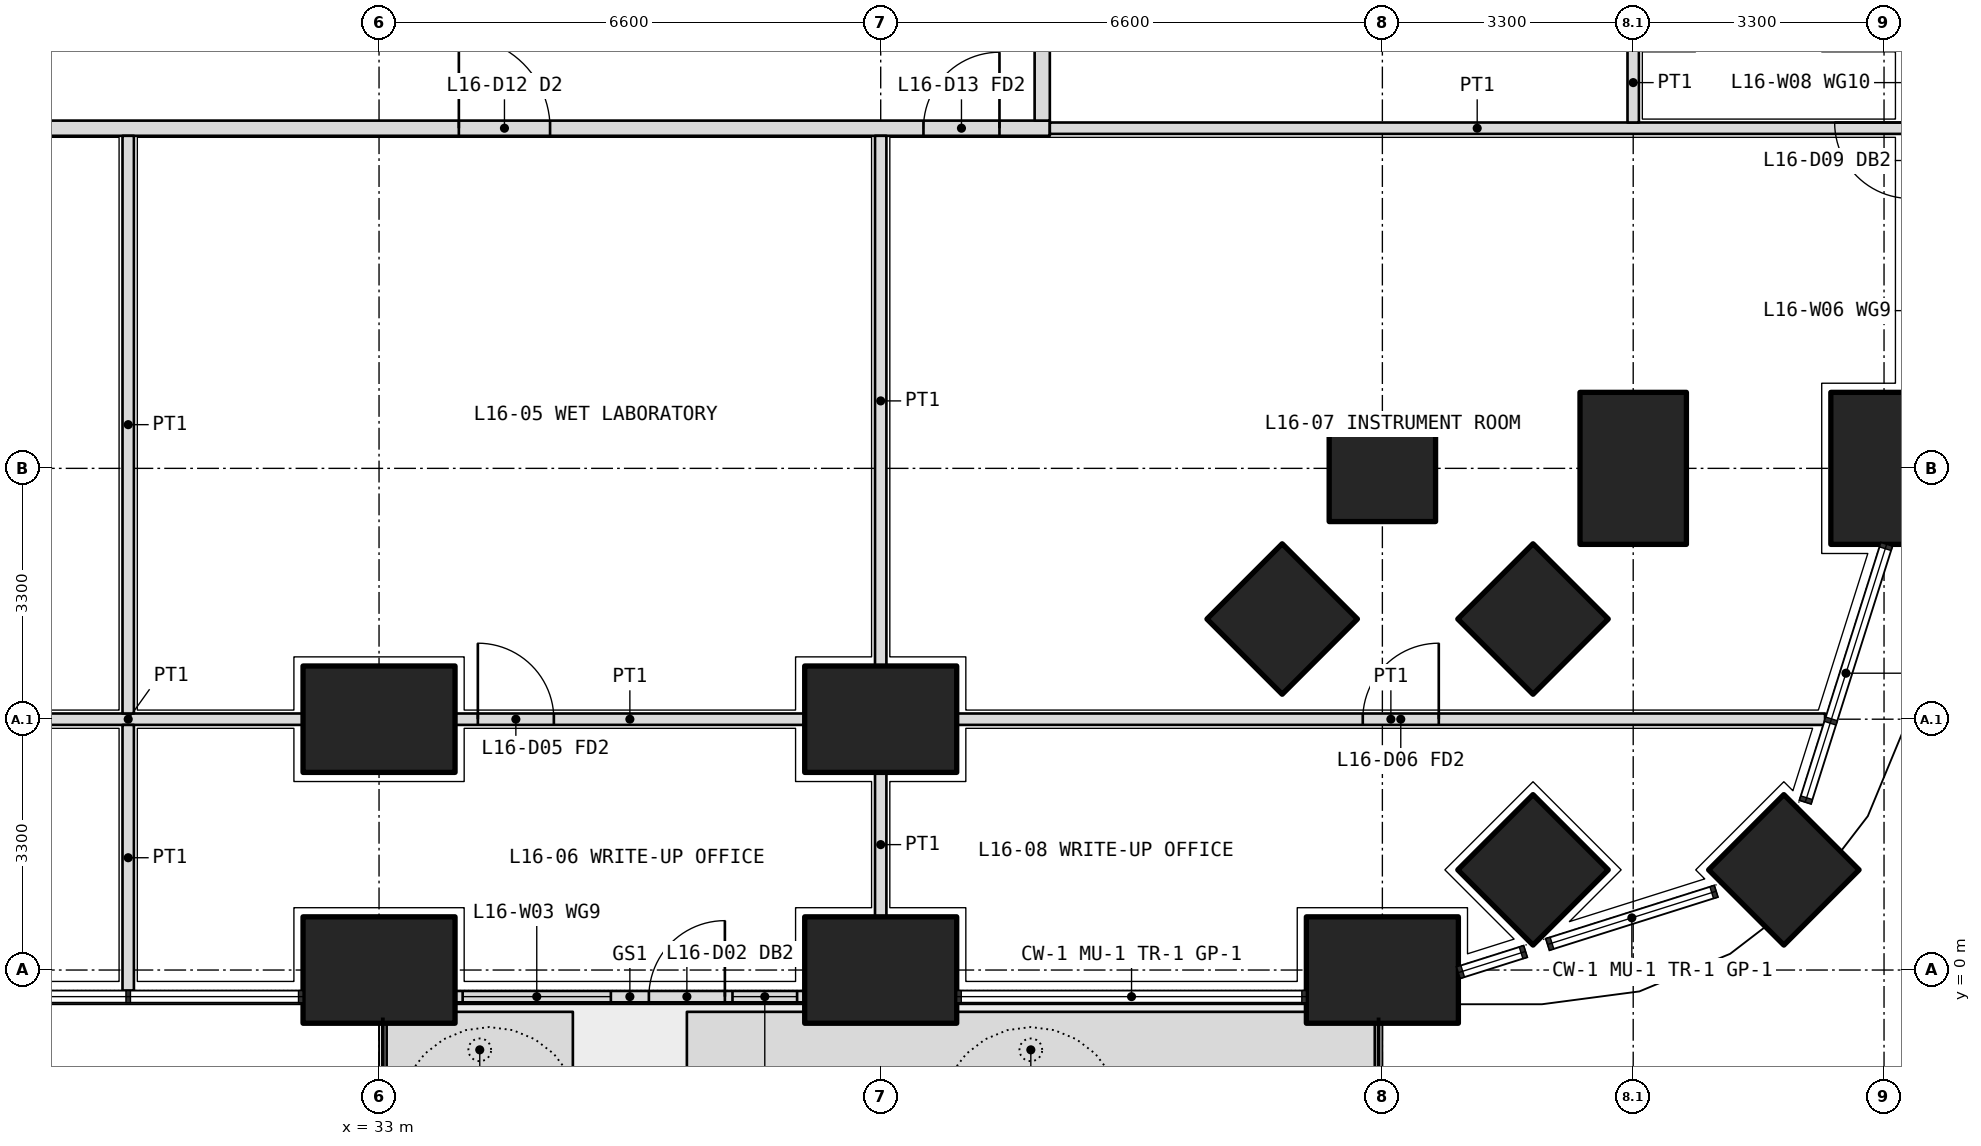
"""IFC4 building model, lengths in metres.
Left out: names, types, materials, properties, quantities, classifications, styles, units other than length and angle.
Written with IfcOpenShell. Run it as: python <this file> out.ifc"""

import sys

from ifc_helpers import new_model, si_unit, direction, frame, frame_2d, origin, origin_2d, place, context, subcontext, project, spatial, polyline, rectangle, outline, extrude, element, fill, save


model = new_model("IFC4")
c1 = context("Model", 3, precision=1e-05, world=origin(), true_north=direction((0.0, 1.0)))
c2 = subcontext(c1, "Body", "Model", "MODEL_VIEW")
j1 = project(units=[si_unit("LENGTHUNIT", "METRE"), si_unit("PLANEANGLEUNIT", "RADIAN")], contexts=[c1])
p1 = place(None, origin())
s1 = spatial("IfcSite", under=j1, at=p1, CompositionType="ELEMENT")
p2 = place(p1, origin())
s2 = spatial("IfcBuilding", under=s1, at=p2, CompositionType="ELEMENT")
p3 = place(p2, frame((0.0, 0.0, 71.7)))
s3 = spatial("IfcBuildingStorey", under=s2, at=p3, CompositionType="ELEMENT", Elevation=71.7)
p4 = place(p3, frame((51.482, 1.318, 0.0), z_axis=(0.0, 0.0, 1.0), x_axis=(0.707106781187, 0.707106781187, 0.0)))
e1 = element("IfcColumn", 1, at=p4, inside=s3, PredefinedType="COLUMN", context=c2, shape_type="SweptSolid", body=[
    extrude(rectangle(XDim=1.4, YDim=1.4, at=origin_2d()), origin(), (0.0, 0.0, 1.0), 4.2),
])
for number, where, z_axis, x_axis in (
    (2, (33.0, 0.0, 0.0), (0.0, 0.0, 1.0), (1.0, 0.0, 0.0)),
    (3, (39.6, 0.0, 0.0), (0.0, 0.0, 1.0), (1.0, 0.0, 0.0)),
    (4, (46.2, 0.0, 0.0), (0.0, 0.0, 1.0), (1.0, 0.0, 0.0)),
    (5, (52.8, 6.6, 0.0), (0.0, 0.0, 1.0), (0.0, 1.0, 0.0)),
):
    element("IfcColumn", number, at=place(p3, frame(where, z_axis=z_axis, x_axis=x_axis)), inside=s3, PredefinedType="COLUMN", context=c2, shape_type="SweptSolid", body=[
        extrude(rectangle(XDim=2.0, YDim=1.4, at=origin_2d()), origin(), (0.0, 0.0, 1.0), 4.2),
    ])
for number, where, z_axis, x_axis in (
    (6, (46.2, 6.6, 0.0), (0.0, 0.0, 1.0), (1.0, 0.0, 0.0)),
    (7, (48.182, 1.318, 0.0), (0.0, 0.0, 1.0), (0.707, 0.707, 0.0)),
):
    element("IfcColumn", number, at=place(p3, frame(where, z_axis=z_axis, x_axis=x_axis)), inside=s3, PredefinedType="COLUMN", context=c2, shape_type="SweptSolid", body=[
        extrude(rectangle(XDim=1.4, YDim=1.4, at=origin_2d()), origin(), (0.0, 0.0, 1.0), 4.2),
    ])
p5 = place(p3, frame((49.5, 6.6, 0.0), z_axis=(0.0, 0.0, 1.0), x_axis=(0.0, 1.0, 0.0)))
e8 = element("IfcColumn", 8, at=p5, inside=s3, PredefinedType="COLUMN", context=c2, shape_type="SweptSolid", body=[
    extrude(rectangle(XDim=2.0, YDim=1.4, at=origin_2d()), origin(), (0.0, 0.0, 1.0), 4.2),
])
p6 = place(p3, frame((48.182, 4.618, 0.0), z_axis=(0.0, 0.0, 1.0), x_axis=(0.707106781187, 0.707106781187, 0.0)))
e9 = element("IfcColumn", 9, at=p6, inside=s3, PredefinedType="COLUMN", context=c2, shape_type="SweptSolid", body=[
    extrude(rectangle(XDim=1.4, YDim=1.4, at=origin_2d()), origin(), (0.0, 0.0, 1.0), 4.2),
])
for number, where, z_axis, x_axis in (
    (10, (33.0, 3.3, 0.0), (0.0, 0.0, 1.0), (1.0, 0.0, 0.0)),
    (11, (39.6, 3.3, 0.0), (0.0, 0.0, 1.0), (1.0, 0.0, 0.0)),
):
    element("IfcColumn", number, at=place(p3, frame(where, z_axis=z_axis, x_axis=x_axis)), inside=s3, PredefinedType="COLUMN", context=c2, shape_type="SweptSolid", body=[
        extrude(rectangle(XDim=2.0, YDim=1.4, at=origin_2d()), origin(), (0.0, 0.0, 1.0), 4.2),
    ])
p7 = place(p3, frame((44.882, 4.618, 0.0), z_axis=(0.0, 0.0, 1.0), x_axis=(0.707106781187, 0.707106781187, 0.0)))
e12 = element("IfcColumn", 12, at=p7, inside=s3, PredefinedType="COLUMN", context=c2, shape_type="SweptSolid", body=[
    extrude(rectangle(XDim=1.4, YDim=1.4, at=origin_2d()), origin(), (0.0, 0.0, 1.0), 4.2),
])
p8 = place(p3, origin())
e13 = element("IfcWall", 13, at=p8, inside=s3, PredefinedType="USERDEFINED", context=c2, shape_type="SweptSolid", body=[
    extrude(outline(polyline([(33.1, -1.55), (35.55, -1.55), (35.55, -0.55), (33.1, -0.55), (33.1, -1.55)]), holes=[polyline([(33.25, -1.4), (35.4, -1.4), (35.4, -0.7), (33.25, -0.7), (33.25, -1.4)])]), origin(), (0.0, 0.0, 1.0), 1.05),
])
p9 = place(p3, origin())
e14 = element("IfcWall", 14, at=p9, inside=s3, PredefinedType="USERDEFINED", context=c2, shape_type="SweptSolid", body=[
    extrude(outline(polyline([(37.05, -1.55), (46.1, -1.55), (46.1, -0.55), (37.05, -0.55), (37.05, -1.55)]), holes=[polyline([(37.2, -1.4), (45.95, -1.4), (45.95, -0.7), (37.2, -0.7), (37.2, -1.4)])]), origin(), (0.0, 0.0, 1.0), 1.05),
])
p10 = place(p3, frame((34.0, -0.35, 0.0), z_axis=(0.0, 0.0, 1.0), x_axis=(1.0, 0.0, 0.0)))
e15 = element("IfcWall", 15, at=p10, inside=s3, PredefinedType="SOLIDWALL", context=c2, shape_type="SweptSolid", body=[
    extrude(rectangle(XDim=4.6, YDim=0.15, at=frame_2d((2.3, 0.0))), origin(), (0.0, 0.0, 1.0), 2.05),
])
p11 = place(p10, frame((2.55, 0.0, 0.0)))
e16 = element("IfcOpeningElement", 16, at=p11, cuts=e15, PredefinedType="OPENING", context=c2, shape_type="SweptSolid", body=[
    extrude(rectangle(XDim=1.0, YDim=2.0, at=frame_2d((0.5, 1.0))), frame((0.0, 0.085, 0.0), z_axis=(0.0, -1.0, 0.0), x_axis=(1.0, 0.0, 0.0)), (0.0, 0.0, 1.0), 0.17),
])
p12 = place(p10, frame((0.1, 0.0, 0.1)))
e17 = element("IfcOpeningElement", 17, at=p12, cuts=e15, PredefinedType="OPENING", context=c2, shape_type="SweptSolid", body=[
    extrude(rectangle(XDim=1.95, YDim=1.65, at=frame_2d((0.975, 0.825))), frame((0.0, 0.085, 0.0), z_axis=(0.0, -1.0, 0.0), x_axis=(1.0, 0.0, 0.0)), (0.0, 0.0, 1.0), 0.17),
])
p13 = place(p10, frame((3.65, 0.0, 0.1)))
e18 = element("IfcOpeningElement", 18, at=p13, cuts=e15, PredefinedType="OPENING", context=c2, shape_type="SweptSolid", body=[
    extrude(rectangle(XDim=0.85, YDim=1.65, at=frame_2d((0.425, 0.825))), frame((0.0, 0.085, 0.0), z_axis=(0.0, -1.0, 0.0), x_axis=(1.0, 0.0, 0.0)), (0.0, 0.0, 1.0), 0.17),
])
p14 = place(p3, frame((10.975, 11.075, 0.0), z_axis=(0.0, 0.0, 1.0), x_axis=(1.0, 0.0, 0.0)))
e19 = element("IfcWall", 19, at=p14, inside=s3, PredefinedType="PARTITIONING", context=c2, shape_type="SweptSolid", body=[
    extrude(rectangle(XDim=30.85, YDim=0.2, at=frame_2d((15.425, 0.0))), origin(), (0.0, 0.0, 1.0), 2.55),
])
p15 = place(p14, frame((2.312, 0.0, 0.0)))
e20 = element("IfcOpeningElement", 20, at=p15, cuts=e19, PredefinedType="OPENING", context=c2, shape_type="SweptSolid", body=[
    extrude(rectangle(XDim=1.0, YDim=2.1, at=frame_2d((0.5, 1.05))), frame((0.0, 0.11, 0.0), z_axis=(0.0, -1.0, 0.0), x_axis=(1.0, 0.0, 0.0)), (0.0, 0.0, 1.0), 0.22),
])
p16 = place(p14, frame((11.625, 0.0, 0.0)))
e21 = element("IfcOpeningElement", 21, at=p16, cuts=e19, PredefinedType="OPENING", context=c2, shape_type="SweptSolid", body=[
    extrude(rectangle(XDim=1.0, YDim=2.1, at=frame_2d((0.5, 1.05))), frame((0.0, 0.11, 0.0), z_axis=(0.0, -1.0, 0.0), x_axis=(1.0, 0.0, 0.0)), (0.0, 0.0, 1.0), 0.22),
])
p17 = place(p14, frame((23.075, 0.0, 0.0)))
e22 = element("IfcOpeningElement", 22, at=p17, cuts=e19, PredefinedType="OPENING", context=c2, shape_type="SweptSolid", body=[
    extrude(rectangle(XDim=1.2, YDim=2.1, at=frame_2d((0.6, 1.05))), frame((0.0, 0.11, 0.0), z_axis=(0.0, -1.0, 0.0), x_axis=(1.0, 0.0, 0.0)), (0.0, 0.0, 1.0), 0.22),
])
p18 = place(p14, frame((29.188, 0.0, 0.0)))
e23 = element("IfcOpeningElement", 23, at=p18, cuts=e19, PredefinedType="OPENING", context=c2, shape_type="SweptSolid", body=[
    extrude(rectangle(XDim=1.0, YDim=2.1, at=frame_2d((0.5, 1.05))), frame((0.0, 0.11, 0.0), z_axis=(0.0, -1.0, 0.0), x_axis=(1.0, 0.0, 0.0)), (0.0, 0.0, 1.0), 0.22),
])
p19 = place(p3, frame((41.725, 11.175, 0.0), z_axis=(0.0, 0.0, 1.0), x_axis=(0.0, 1.0, 0.0)))
e24 = element("IfcWall", 24, at=p19, inside=s3, PredefinedType="PARTITIONING", context=c2, shape_type="SweptSolid", body=[
    extrude(rectangle(XDim=23.85, YDim=0.2, at=frame_2d((11.925, 0.0))), origin(), (0.0, 0.0, 1.0), 2.55),
])
p20 = place(p19, frame((3.762, 0.0, 0.0)))
e25 = element("IfcOpeningElement", 25, at=p20, cuts=e24, PredefinedType="OPENING", context=c2, shape_type="SweptSolid", body=[
    extrude(rectangle(XDim=1.0, YDim=2.1, at=frame_2d((0.5, 1.05))), frame((0.0, 0.11, 0.0), z_axis=(0.0, -1.0, 0.0), x_axis=(1.0, 0.0, 0.0)), (0.0, 0.0, 1.0), 0.22),
])
p21 = place(p19, frame((9.625, 0.0, 0.0)))
e26 = element("IfcOpeningElement", 26, at=p21, cuts=e24, PredefinedType="OPENING", context=c2, shape_type="SweptSolid", body=[
    extrude(rectangle(XDim=1.0, YDim=2.1, at=frame_2d((0.5, 1.05))), frame((0.0, 0.11, 0.0), z_axis=(0.0, -1.0, 0.0), x_axis=(1.0, 0.0, 0.0)), (0.0, 0.0, 1.0), 0.22),
])
p22 = place(p19, frame((12.975, 0.0, 0.0)))
e27 = element("IfcOpeningElement", 27, at=p22, cuts=e24, PredefinedType="OPENING", context=c2, shape_type="SweptSolid", body=[
    extrude(rectangle(XDim=0.9, YDim=2.1, at=frame_2d((0.45, 1.05))), frame((0.0, 0.11, 0.0), z_axis=(0.0, -1.0, 0.0), x_axis=(1.0, 0.0, 0.0)), (0.0, 0.0, 1.0), 0.22),
])
p23 = place(p19, frame((16.275, 0.0, 0.0)))
e28 = element("IfcOpeningElement", 28, at=p23, cuts=e24, PredefinedType="OPENING", context=c2, shape_type="SweptSolid", body=[
    extrude(rectangle(XDim=1.2, YDim=2.1, at=frame_2d((0.6, 1.05))), frame((0.0, 0.11, 0.0), z_axis=(0.0, -1.0, 0.0), x_axis=(1.0, 0.0, 0.0)), (0.0, 0.0, 1.0), 0.22),
])
p24 = place(p19, frame((19.575, 0.0, 0.0)))
e29 = element("IfcOpeningElement", 29, at=p24, cuts=e24, PredefinedType="OPENING", context=c2, shape_type="SweptSolid", body=[
    extrude(rectangle(XDim=1.2, YDim=2.1, at=frame_2d((0.6, 1.05))), frame((0.0, 0.11, 0.0), z_axis=(0.0, -1.0, 0.0), x_axis=(1.0, 0.0, 0.0)), (0.0, 0.0, 1.0), 0.22),
])
p25 = place(p19, frame((22.288, 0.0, 0.0)))
e30 = element("IfcOpeningElement", 30, at=p25, cuts=e24, PredefinedType="OPENING", context=c2, shape_type="SweptSolid", body=[
    extrude(rectangle(XDim=1.2, YDim=2.1, at=frame_2d((0.6, 1.05))), frame((0.0, 0.11, 0.0), z_axis=(0.0, -1.0, 0.0), x_axis=(1.0, 0.0, 0.0)), (0.0, 0.0, 1.0), 0.22),
])
p26 = place(p3, frame((53.07, 11.075, 0.0), z_axis=(0.0, 0.0, 1.0), x_axis=(-1.0, 0.0, 0.0)))
e31 = element("IfcWall", 31, at=p26, inside=s3, PredefinedType="PARTITIONING", context=c2, shape_type="SweptSolid", body=[
    extrude(rectangle(XDim=11.245, YDim=0.15, at=frame_2d((5.623, 0.0))), origin(), (0.0, 0.0, 1.0), 3.85),
])
p27 = place(p3, frame((27.4, 3.3, 0.0), z_axis=(0.0, 0.0, 1.0), x_axis=(1.0, 0.0, 0.0)))
e32 = element("IfcWall", 32, at=p27, inside=s3, PredefinedType="PARTITIONING", context=c2, shape_type="SweptSolid", body=[
    extrude(rectangle(XDim=4.6, YDim=0.15, at=frame_2d((2.3, 0.0))), origin(), (0.0, 0.0, 1.0), 2.55),
])
p28 = place(p3, frame((34.0, 3.3, 0.0), z_axis=(0.0, 0.0, 1.0), x_axis=(1.0, 0.0, 0.0)))
e33 = element("IfcWall", 33, at=p28, inside=s3, PredefinedType="PARTITIONING", context=c2, shape_type="SweptSolid", body=[
    extrude(rectangle(XDim=4.6, YDim=0.15, at=frame_2d((2.3, 0.0))), origin(), (0.0, 0.0, 1.0), 2.55),
])
p29 = place(p28, frame((0.3, 0.0, 0.0)))
e34 = element("IfcOpeningElement", 34, at=p29, cuts=e33, PredefinedType="OPENING", context=c2, shape_type="SweptSolid", body=[
    extrude(rectangle(XDim=1.0, YDim=2.1, at=frame_2d((0.5, 1.05))), frame((0.0, 0.085, 0.0), z_axis=(0.0, -1.0, 0.0), x_axis=(1.0, 0.0, 0.0)), (0.0, 0.0, 1.0), 0.17),
])
p30 = place(p3, frame((40.6, 3.3, 0.0), z_axis=(0.0, 0.0, 1.0), x_axis=(1.0, 0.0, 0.0)))
e35 = element("IfcWall", 35, at=p30, inside=s3, PredefinedType="PARTITIONING", context=c2, shape_type="SweptSolid", body=[
    extrude(rectangle(XDim=11.424, YDim=0.15, at=frame_2d((5.712, 0.0))), origin(), (0.0, 0.0, 1.0), 3.85),
])
p31 = place(p30, frame((5.342, 0.0, 0.0)))
e36 = element("IfcOpeningElement", 36, at=p31, cuts=e35, PredefinedType="OPENING", context=c2, shape_type="SweptSolid", body=[
    extrude(rectangle(XDim=1.0, YDim=2.1, at=frame_2d((0.5, 1.05))), frame((0.0, 0.085, 0.0), z_axis=(0.0, -1.0, 0.0), x_axis=(1.0, 0.0, 0.0)), (0.0, 0.0, 1.0), 0.17),
])
p32 = place(p3, frame((29.7, -0.27, 0.0), z_axis=(0.0, 0.0, 1.0), x_axis=(0.0, 1.0, 0.0)))
e37 = element("IfcWall", 37, at=p32, inside=s3, PredefinedType="PARTITIONING", context=c2, shape_type="SweptSolid", body=[
    extrude(rectangle(XDim=3.495, YDim=0.15, at=frame_2d((1.748, 0.0))), origin(), (0.0, 0.0, 1.0), 3.85),
])
p33 = place(p3, frame((29.7, 3.375, 0.0), z_axis=(0.0, 0.0, 1.0), x_axis=(0.0, 1.0, 0.0)))
e38 = element("IfcWall", 38, at=p33, inside=s3, PredefinedType="PARTITIONING", context=c2, shape_type="SweptSolid", body=[
    extrude(rectangle(XDim=7.6, YDim=0.15, at=frame_2d((3.8, 0.0))), origin(), (0.0, 0.0, 1.0), 3.85),
])
p34 = place(p3, frame((39.6, 0.7, 0.0), z_axis=(0.0, 0.0, 1.0), x_axis=(0.0, 1.0, 0.0)))
e39 = element("IfcWall", 39, at=p34, inside=s3, PredefinedType="PARTITIONING", context=c2, shape_type="SweptSolid", body=[
    extrude(rectangle(XDim=1.9, YDim=0.15, at=frame_2d((0.95, 0.0))), origin(), (0.0, 0.0, 1.0), 2.55),
])
p35 = place(p3, frame((39.6, 4.0, 0.0), z_axis=(0.0, 0.0, 1.0), x_axis=(0.0, 1.0, 0.0)))
e40 = element("IfcWall", 40, at=p35, inside=s3, PredefinedType="PARTITIONING", context=c2, shape_type="SweptSolid", body=[
    extrude(rectangle(XDim=6.975, YDim=0.15, at=frame_2d((3.488, 0.0))), origin(), (0.0, 0.0, 1.0), 2.55),
])
p36 = place(p3, frame((49.5, 11.15, 0.0), z_axis=(0.0, 0.0, 1.0), x_axis=(0.0, 1.0, 0.0)))
e41 = element("IfcWall", 41, at=p36, inside=s3, PredefinedType="PARTITIONING", context=c2, shape_type="SweptSolid", body=[
    extrude(rectangle(XDim=1.05, YDim=0.15, at=frame_2d((0.525, 0.0))), origin(), (0.0, 0.0, 1.0), 2.55),
])
p37 = place(p11, origin())
e42 = element("IfcDoor", 42, at=p37, inside=s3, OperationType="SINGLE_SWING_RIGHT", PredefinedType="DOOR", context=c2, shape_type="SweptSolid", body=[
    extrude(rectangle(XDim=1.0, YDim=2.0, at=frame_2d((0.5, 1.0))), frame((0.0, 0.025, 0.0), z_axis=(0.0, -1.0, 0.0), x_axis=(1.0, 0.0, 0.0)), (0.0, 0.0, 1.0), 0.05),
])
fill(e16, e42)
p38 = place(p12, origin())
e43 = element("IfcWindow", 43, at=p38, inside=s3, PartitioningType="SINGLE_PANEL", PredefinedType="WINDOW", context=c2, shape_type="SweptSolid", body=[
    extrude(rectangle(XDim=1.95, YDim=1.65, at=frame_2d((0.975, 0.825))), frame((0.0, 0.03, 0.0), z_axis=(0.0, -1.0, 0.0), x_axis=(1.0, 0.0, 0.0)), (0.0, 0.0, 1.0), 0.06),
])
fill(e17, e43)
p39 = place(p13, origin())
e44 = element("IfcWindow", 44, at=p39, inside=s3, PartitioningType="SINGLE_PANEL", PredefinedType="WINDOW", context=c2, shape_type="SweptSolid", body=[
    extrude(rectangle(XDim=0.85, YDim=1.65, at=frame_2d((0.425, 0.825))), frame((0.0, 0.03, 0.0), z_axis=(0.0, -1.0, 0.0), x_axis=(1.0, 0.0, 0.0)), (0.0, 0.0, 1.0), 0.06),
])
fill(e18, e44)
p40 = place(p17, origin())
e45 = element("IfcDoor", 45, at=p40, inside=s3, OperationType="DOUBLE_DOOR_SINGLE_SWING", PredefinedType="DOOR", context=c2, shape_type="SweptSolid", body=[
    extrude(rectangle(XDim=1.2, YDim=2.1, at=frame_2d((0.6, 1.05))), frame((0.0, 0.025, 0.0), z_axis=(0.0, -1.0, 0.0), x_axis=(1.0, 0.0, 0.0)), (0.0, 0.0, 1.0), 0.05),
])
fill(e22, e45)
p41 = place(p29, origin())
e46 = element("IfcDoor", 46, at=p41, inside=s3, OperationType="SINGLE_SWING_LEFT", PredefinedType="DOOR", context=c2, shape_type="SweptSolid", body=[
    extrude(rectangle(XDim=1.0, YDim=2.1, at=frame_2d((0.5, 1.05))), frame((0.0, 0.025, 0.0), z_axis=(0.0, -1.0, 0.0), x_axis=(1.0, 0.0, 0.0)), (0.0, 0.0, 1.0), 0.05),
])
fill(e34, e46)
p42 = place(p18, origin())
e47 = element("IfcDoor", 47, at=p42, inside=s3, OperationType="SINGLE_SWING_RIGHT", PredefinedType="DOOR", context=c2, shape_type="SweptSolid", body=[
    extrude(rectangle(XDim=1.0, YDim=2.1, at=frame_2d((0.5, 1.05))), frame((0.0, 0.025, 0.0), z_axis=(0.0, -1.0, 0.0), x_axis=(1.0, 0.0, 0.0)), (0.0, 0.0, 1.0), 0.05),
])
fill(e23, e47)
p43 = place(p31, origin())
e48 = element("IfcDoor", 48, at=p43, inside=s3, OperationType="SINGLE_SWING_RIGHT", PredefinedType="DOOR", context=c2, shape_type="SweptSolid", body=[
    extrude(rectangle(XDim=1.0, YDim=2.1, at=frame_2d((0.5, 1.05))), frame((0.0, 0.025, 0.0), z_axis=(0.0, -1.0, 0.0), x_axis=(1.0, 0.0, 0.0)), (0.0, 0.0, 1.0), 0.05),
])
fill(e36, e48)
save(model, sys.argv[1])
